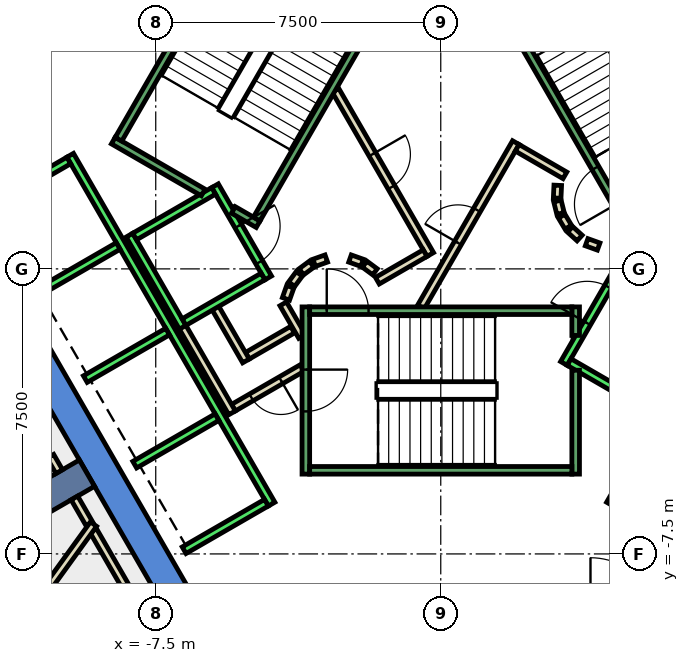
"""IFC4 building model, lengths in metres.
Left out: names, types, materials, properties, quantities, classifications, styles, units other than length and angle.
Written with IfcOpenShell. Run it as: python <this file> out.ifc"""

import sys

from ifc_helpers import new_model, si_unit, direction, frame, frame_2d, origin, place, context, subcontext, project, spatial, polyline, rectangle, outline, extrude, element, fill, save


model = new_model("IFC4")
c1 = context("Model", 3, precision=1e-05, world=origin(), true_north=direction((0.0, 1.0)))
c2 = subcontext(c1, "Body", "Model", "MODEL_VIEW")
j1 = project(units=[si_unit("LENGTHUNIT", "METRE"), si_unit("PLANEANGLEUNIT", "RADIAN")], contexts=[c1])
p1 = place(None, origin())
s1 = spatial("IfcSite", under=j1, at=p1, CompositionType="ELEMENT")
p2 = place(p1, origin())
s2 = spatial("IfcBuilding", under=s1, at=p2, CompositionType="ELEMENT")
p3 = place(p2, frame((0.0, 0.0, 171.8)))
s3 = spatial("IfcBuildingStorey", under=s2, at=p3, CompositionType="ELEMENT", Elevation=171.8)
p4 = place(p3, frame((0.0, 0.0, -0.4)))
e1 = element("IfcWall", 1, at=p4, inside=s3, PredefinedType="SHEAR", context=c2, shape_type="SweptSolid", body=[
    extrude(outline(polyline([(-12.267, 5.252), (-11.575, 4.852), (-6.466, 13.7), (-6.928, 14.5), (-12.267, 5.252)])), origin(), (0.0, 0.0, 1.0), 4.2),
])
p5 = place(p3, frame((0.0, 0.0, -0.4)))
e2 = element("IfcWall", 2, at=p5, inside=s3, PredefinedType="SHEAR", context=c2, shape_type="SweptSolid", body=[
    extrude(outline(polyline([(-13.856, 2.5), (-6.928, -9.5), (-6.466, -8.7), (-12.933, 2.5), (-13.856, 2.5)])), origin(), (0.0, 0.0, 1.0), 4.2),
])
p6 = place(p3, frame((-9.31, -5.375, -0.4), z_axis=(0.0, 0.0, 1.0), x_axis=(-0.866017533419, -0.500013631625, 0.0)))
e3 = element("IfcWall", 3, at=p6, inside=s3, PredefinedType="SHEAR", context=c2, shape_type="SweptSolid", body=[
    extrude(rectangle(XDim=9.0, YDim=0.8, at=frame_2d((4.5, 0.0))), origin(), (0.0, 0.0, 1.0), 4.2),
])
p7 = place(p3, frame((-3.9, -1.599, 0.0), z_axis=(0.0, 0.0, 1.0), x_axis=(-0.865969445389, -0.500096910261, 0.0)))
e4 = element("IfcWall", 4, at=p7, inside=s3, PredefinedType="PARTITIONING", context=c2, shape_type="SweptSolid", body=[
    extrude(rectangle(XDim=1.373, YDim=0.2, at=frame_2d((0.687, 0.0))), origin(), (0.0, 0.0, 1.0), 3.8),
])
p8 = place(p3, frame((-5.126, -2.422, 0.0), z_axis=(0.0, 0.0, 1.0), x_axis=(-0.500062241894, 0.865989465428, 0.0)))
e5 = element("IfcWall", 5, at=p8, inside=s3, PredefinedType="PARTITIONING", context=c2, shape_type="SweptSolid", body=[
    extrude(rectangle(XDim=1.7, YDim=0.2, at=frame_2d((0.85, 0.0))), origin(), (0.0, 0.0, 1.0), 3.8),
])
p9 = place(p3, frame((-3.65, -2.61, 0.0), z_axis=(0.0, 0.0, 1.0), x_axis=(-0.866072462134, -0.499918483688, 0.0)))
e6 = element("IfcWall", 6, at=p9, inside=s3, PredefinedType="PARTITIONING", context=c2, shape_type="SweptSolid", body=[
    extrude(rectangle(XDim=2.084, YDim=0.2, at=frame_2d((1.042, 0.0))), origin(), (0.0, 0.0, 1.0), 3.8),
])
p10 = place(p9, frame((0.642, 0.0, 0.0)))
e7 = element("IfcOpeningElement", 7, at=p10, cuts=e6, PredefinedType="OPENING", context=c2, shape_type="SweptSolid", body=[
    extrude(rectangle(XDim=0.9, YDim=2.1, at=frame_2d((0.45, 1.05))), frame((0.0, 0.11, 0.0), z_axis=(0.0, -1.0, 0.0), x_axis=(1.0, 0.0, 0.0)), (0.0, 0.0, 1.0), 0.22),
])
p11 = place(p3, frame((-5.492, -3.788, 0.0), z_axis=(0.0, 0.0, 1.0), x_axis=(-0.500008949224, 0.866020236886, 0.0)))
e8 = element("IfcWall", 8, at=p11, inside=s3, PredefinedType="PARTITIONING", context=c2, shape_type="SweptSolid", body=[
    extrude(rectangle(XDim=2.68, YDim=0.2, at=frame_2d((1.34, 0.0))), origin(), (0.0, 0.0, 1.0), 3.8),
])
p12 = place(p3, frame((-4.145, -0.92, 0.0), z_axis=(0.0, 0.0, 1.0), x_axis=(0.499743786207, -0.866173278362, 0.0)))
e9 = element("IfcWall", 9, at=p12, inside=s3, PredefinedType="PARTITIONING", context=c2, shape_type="SweptSolid", body=[
    extrude(rectangle(XDim=0.991, YDim=0.2, at=frame_2d((0.495, 0.0))), origin(), (0.0, 0.0, 1.0), 3.8),
])
p13 = place(p3, frame((-0.52, -1.0, 0.0), z_axis=(0.0, 0.0, 1.0), x_axis=(0.50011622646, 0.865958290007, 0.0)))
e10 = element("IfcWall", 10, at=p13, inside=s3, PredefinedType="PARTITIONING", context=c2, shape_type="SweptSolid", body=[
    extrude(rectangle(XDim=4.991, YDim=0.2, at=frame_2d((2.496, 0.0))), origin(), (0.0, 0.0, 1.0), 3.8),
])
p14 = place(p13, frame((1.945, 0.0, 0.0)))
e11 = element("IfcOpeningElement", 11, at=p14, cuts=e10, PredefinedType="OPENING", context=c2, shape_type="SweptSolid", body=[
    extrude(rectangle(XDim=1.0, YDim=2.1, at=frame_2d((0.5, 1.05))), frame((0.0, 0.11, 0.0), z_axis=(0.0, -1.0, 0.0), x_axis=(1.0, 0.0, 0.0)), (0.0, 0.0, 1.0), 0.22),
])
p15 = place(p3, frame((2.012, 3.186, 0.0), z_axis=(0.0, 0.0, 1.0), x_axis=(0.865891012941, -0.500232699559, 0.0)))
e12 = element("IfcWall", 12, at=p15, inside=s3, PredefinedType="PARTITIONING", context=c2, shape_type="SweptSolid", body=[
    extrude(rectangle(XDim=1.449, YDim=0.2, at=frame_2d((0.725, 0.0))), origin(), (0.0, 0.0, 1.0), 3.8),
])
p16 = place(p3, frame((3.079, 2.199, 0.0), z_axis=(0.0, 0.0, 1.0), x_axis=(-0.047771483479, -0.998858290933, 0.0)))
e13 = element("IfcWall", 13, at=p16, inside=s3, PredefinedType="PARTITIONING", context=c2, shape_type="SweptSolid", body=[
    extrude(rectangle(XDim=0.337, YDim=0.2, at=frame_2d((0.169, 0.0))), origin(), (0.0, 0.0, 1.0), 3.8),
])
p17 = place(p3, frame((3.07, 1.786, 0.0), z_axis=(0.0, 0.0, 1.0), x_axis=(0.242705583207, -0.970099994784, 0.0)))
e14 = element("IfcWall", 14, at=p17, inside=s3, PredefinedType="PARTITIONING", context=c2, shape_type="SweptSolid", body=[
    extrude(rectangle(XDim=0.338, YDim=0.2, at=frame_2d((0.169, 0.0))), origin(), (0.0, 0.0, 1.0), 3.8),
])
for number, where, z_axis, x_axis in (
    (15, (3.182, 1.388, 0.0), (0.0, 0.0, 1.0), (0.512, -0.859, 0.0)),
    (16, (3.404, 1.039, 0.0), (0.0, 0.0, 1.0), (0.74, -0.672, 0.0)),
):
    element("IfcWall", number, at=place(p3, frame(where, z_axis=z_axis, x_axis=x_axis)), inside=s3, PredefinedType="PARTITIONING", context=c2, shape_type="SweptSolid", body=[
        extrude(rectangle(XDim=0.338, YDim=0.2, at=frame_2d((0.169, 0.0))), origin(), (0.0, 0.0, 1.0), 3.8),
    ])
p18 = place(p3, frame((3.838, 0.702, 0.0), z_axis=(0.0, 0.0, 1.0), x_axis=(0.941035081519, -0.338308993895, 0.0)))
e17 = element("IfcWall", 17, at=p18, inside=s3, PredefinedType="PARTITIONING", context=c2, shape_type="SweptSolid", body=[
    extrude(rectangle(XDim=0.337, YDim=0.2, at=frame_2d((0.168, 0.0))), origin(), (0.0, 0.0, 1.0), 3.8),
])
p19 = place(p3, frame((-2.771, 4.7, 0.0), z_axis=(0.0, 0.0, 1.0), x_axis=(0.499969479948, -0.866043023828, 0.0)))
e18 = element("IfcWall", 18, at=p19, inside=s3, PredefinedType="PARTITIONING", context=c2, shape_type="SweptSolid", body=[
    extrude(rectangle(XDim=4.99, YDim=0.2, at=frame_2d((2.495, 0.0))), origin(), (0.0, 0.0, 1.0), 3.8),
])
p20 = place(p19, frame((1.945, 0.0, 0.0)))
e19 = element("IfcOpeningElement", 19, at=p20, cuts=e18, PredefinedType="OPENING", context=c2, shape_type="SweptSolid", body=[
    extrude(rectangle(XDim=1.0, YDim=2.1, at=frame_2d((0.5, 1.05))), frame((0.0, 0.11, 0.0), z_axis=(0.0, -1.0, 0.0), x_axis=(1.0, 0.0, 0.0)), (0.0, 0.0, 1.0), 0.22),
])
p21 = place(p3, frame((-0.412, 0.414, 0.0), z_axis=(0.0, 0.0, 1.0), x_axis=(-0.866017369001, -0.500013916395, 0.0)))
e20 = element("IfcWall", 20, at=p21, inside=s3, PredefinedType="PARTITIONING", context=c2, shape_type="SweptSolid", body=[
    extrude(rectangle(XDim=1.45, YDim=0.2, at=frame_2d((0.725, 0.0))), origin(), (0.0, 0.0, 1.0), 3.8),
])
p22 = place(p3, frame((-1.731, -0.077, 0.0), z_axis=(0.0, 0.0, 1.0), x_axis=(-0.804311165252, 0.594208338422, 0.0)))
e21 = element("IfcWall", 21, at=p22, inside=s3, PredefinedType="PARTITIONING", context=c2, shape_type="SweptSolid", body=[
    extrude(rectangle(XDim=0.338, YDim=0.2, at=frame_2d((0.169, 0.0))), origin(), (0.0, 0.0, 1.0), 3.8),
])
p23 = place(p3, frame((-2.07, 0.16, 0.0), z_axis=(0.0, 0.0, 1.0), x_axis=(-0.942199461132, 0.335052496547, 0.0)))
e22 = element("IfcWall", 22, at=p23, inside=s3, PredefinedType="PARTITIONING", context=c2, shape_type="SweptSolid", body=[
    extrude(rectangle(XDim=0.337, YDim=0.2, at=frame_2d((0.169, 0.0))), origin(), (0.0, 0.0, 1.0), 3.8),
])
p24 = place(p3, frame((-3.012, 0.273, 0.0), z_axis=(0.0, 0.0, 1.0), x_axis=(-0.942280615813, -0.334824194261, 0.0)))
e23 = element("IfcWall", 23, at=p24, inside=s3, PredefinedType="PARTITIONING", context=c2, shape_type="SweptSolid", body=[
    extrude(rectangle(XDim=0.338, YDim=0.2, at=frame_2d((0.169, 0.0))), origin(), (0.0, 0.0, 1.0), 3.8),
])
p25 = place(p3, frame((-3.397, 0.124, 0.0), z_axis=(0.0, 0.0, 1.0), x_axis=(-0.804311165252, -0.594208338422, 0.0)))
e24 = element("IfcWall", 24, at=p25, inside=s3, PredefinedType="PARTITIONING", context=c2, shape_type="SweptSolid", body=[
    extrude(rectangle(XDim=0.338, YDim=0.2, at=frame_2d((0.169, 0.0))), origin(), (0.0, 0.0, 1.0), 3.8),
])
p26 = place(p3, frame((-3.723, -0.131, 0.0), z_axis=(0.0, 0.0, 1.0), x_axis=(-0.594675113454, -0.803966112121, 0.0)))
e25 = element("IfcWall", 25, at=p26, inside=s3, PredefinedType="PARTITIONING", context=c2, shape_type="SweptSolid", body=[
    extrude(rectangle(XDim=0.338, YDim=0.2, at=frame_2d((0.169, 0.0))), origin(), (0.0, 0.0, 1.0), 3.8),
])
p27 = place(p3, frame((-3.96, -0.47, 0.0), z_axis=(0.0, 0.0, 1.0), x_axis=(-0.334824194261, -0.942280615813, 0.0)))
e26 = element("IfcWall", 26, at=p27, inside=s3, PredefinedType="PARTITIONING", context=c2, shape_type="SweptSolid", body=[
    extrude(rectangle(XDim=0.338, YDim=0.2, at=frame_2d((0.169, 0.0))), origin(), (0.0, 0.0, 1.0), 3.8),
])
p28 = place(p3, frame((-7.862, -9.107, 0.0), z_axis=(0.0, 0.0, 1.0), x_axis=(-0.499994038704, 0.866028845513, 0.0)))
e27 = element("IfcWall", 27, at=p28, inside=s3, PredefinedType="PARTITIONING", context=c2, shape_type="SweptSolid", body=[
    extrude(rectangle(XDim=2.568, YDim=0.2, at=frame_2d((1.284, 0.0))), origin(), (0.0, 0.0, 1.0), 3.8),
])
p29 = place(p3, frame((-9.246, -6.71, 0.0), z_axis=(0.0, 0.0, 1.0), x_axis=(-0.499570510076, 0.86627322795, 0.0)))
e28 = element("IfcWall", 28, at=p29, inside=s3, PredefinedType="PARTITIONING", context=c2, shape_type="SweptSolid", body=[
    extrude(rectangle(XDim=0.788, YDim=0.2, at=frame_2d((0.394, 0.0))), origin(), (0.0, 0.0, 1.0), 3.8),
])
p30 = place(p3, frame((-13.744, -13.076, 0.0), z_axis=(0.0, 0.0, 1.0), x_axis=(0.586577314901, 0.809893235953, 0.0)))
e29 = element("IfcWall", 29, at=p30, inside=s3, PredefinedType="PARTITIONING", context=c2, shape_type="SweptSolid", body=[
    extrude(rectangle(XDim=7.854, YDim=0.2, at=frame_2d((3.927, 0.0))), origin(), (0.0, 0.0, 1.0), 3.8),
])
p31 = place(p3, frame((-10.04, -5.334, 0.0), z_axis=(0.0, 0.0, 1.0), x_axis=(-0.499405191234, 0.86636854454, 0.0)))
e30 = element("IfcWall", 30, at=p31, inside=s3, PredefinedType="PARTITIONING", context=c2, shape_type="SweptSolid", body=[
    extrude(rectangle(XDim=0.466, YDim=0.2, at=frame_2d((0.233, 0.0))), origin(), (0.0, 0.0, 1.0), 3.8),
])
p32 = place(p3, frame((-5.94, 2.188, 0.0), z_axis=(0.0, 0.0, 1.0), x_axis=(0.49994636267, -0.866056369097, 0.0)))
e31 = element("IfcWall", 31, at=p32, inside=s3, PredefinedType="STANDARD", context=c2, shape_type="SweptSolid", body=[
    extrude(rectangle(XDim=2.8, YDim=0.2, at=frame_2d((1.4, 0.0))), origin(), (0.0, 0.0, 1.0), 3.8),
])
p33 = place(p32, frame((1.225, 0.0, 0.0)))
e32 = element("IfcOpeningElement", 32, at=p33, cuts=e31, PredefinedType="OPENING", context=c2, shape_type="SweptSolid", body=[
    extrude(rectangle(XDim=1.1, YDim=2.1, at=frame_2d((0.55, 1.05))), frame((0.0, 0.11, 0.0), z_axis=(0.0, -1.0, 0.0), x_axis=(1.0, 0.0, 0.0)), (0.0, 0.0, 1.0), 0.22),
])
p34 = place(p3, frame((-8.192, 0.888, 0.0), z_axis=(0.0, 0.0, 1.0), x_axis=(0.49994636267, -0.866056369097, 0.0)))
e33 = element("IfcWall", 33, at=p34, inside=s3, PredefinedType="STANDARD", context=c2, shape_type="SweptSolid", body=[
    extrude(rectangle(XDim=2.8, YDim=0.2, at=frame_2d((1.4, 0.0))), origin(), (0.0, 0.0, 1.0), 3.8),
])
for number, where, z_axis, x_axis in (
    (34, (-5.977, 2.052, 0.0), (0.0, 0.0, 1.0), (-0.866, -0.5, 0.0)),
    (35, (-4.677, -0.2, 0.0), (0.0, 0.0, 1.0), (-0.866, -0.5, 0.0)),
):
    element("IfcWall", number, at=place(p3, frame(where, z_axis=z_axis, x_axis=x_axis)), inside=s3, PredefinedType="STANDARD", context=c2, shape_type="SweptSolid", body=[
        extrude(rectangle(XDim=2.399, YDim=0.2, at=frame_2d((1.2, 0.0))), origin(), (0.0, 0.0, 1.0), 3.8),
    ])
p35 = place(p3, frame((-9.751, 2.99, 0.0), z_axis=(0.0, 0.0, 1.0), x_axis=(0.50000090737, -0.866024879913, 0.0)))
e36 = element("IfcWall", 36, at=p35, inside=s3, PredefinedType="STANDARD", context=c2, shape_type="SweptSolid", body=[
    extrude(rectangle(XDim=10.6, YDim=0.2, at=frame_2d((5.3, 0.0))), origin(), (0.0, 0.0, 1.0), 3.8),
])
p36 = place(p3, frame((-9.788, 2.853, 0.0), z_axis=(0.0, 0.0, 1.0), x_axis=(-0.865998541277, -0.500046524342, 0.0)))
e37 = element("IfcWall", 37, at=p36, inside=s3, PredefinedType="STANDARD", context=c2, shape_type="SweptSolid", body=[
    extrude(rectangle(XDim=2.5, YDim=0.2, at=frame_2d((1.25, 0.0))), origin(), (0.0, 0.0, 1.0), 3.8),
])
for number, where, z_axis, x_axis in (
    (38, (-8.488, 0.602, 0.0), (0.0, 0.0, 1.0), (-0.866, -0.5, 0.0)),
    (39, (-7.188, -1.65, 0.0), (0.0, 0.0, 1.0), (-0.866, -0.5, 0.0)),
    (40, (-5.888, -3.902, 0.0), (0.0, 0.0, 1.0), (-0.866, -0.5, 0.0)),
    (41, (-4.588, -6.153, 0.0), (0.0, 0.0, 1.0), (-0.866, -0.5, 0.0)),
):
    element("IfcWall", number, at=place(p3, frame(where, z_axis=z_axis, x_axis=x_axis)), inside=s3, PredefinedType="STANDARD", context=c2, shape_type="SweptSolid", body=[
        extrude(rectangle(XDim=2.5, YDim=0.2, at=frame_2d((1.25, 0.0))), origin(), (0.0, 0.0, 1.0), 3.8),
    ])
p37 = place(p3, frame((3.24, -2.488, 0.0), z_axis=(0.0, 0.0, 1.0), x_axis=(0.49994636267, 0.866056369097, 0.0)))
e42 = element("IfcWall", 42, at=p37, inside=s3, PredefinedType="STANDARD", context=c2, shape_type="SweptSolid", body=[
    extrude(rectangle(XDim=2.8, YDim=0.2, at=frame_2d((1.4, 0.0))), origin(), (0.0, 0.0, 1.0), 3.8),
])
p38 = place(p37, frame((1.225, 0.0, 0.0)))
e43 = element("IfcOpeningElement", 43, at=p38, cuts=e42, PredefinedType="OPENING", context=c2, shape_type="SweptSolid", body=[
    extrude(rectangle(XDim=1.1, YDim=2.1, at=frame_2d((0.55, 1.05))), frame((0.0, 0.11, 0.0), z_axis=(0.0, -1.0, 0.0), x_axis=(1.0, 0.0, 0.0)), (0.0, 0.0, 1.0), 0.22),
])
p39 = place(p3, frame((3.377, -2.452, 0.0), z_axis=(0.0, 0.0, 1.0), x_axis=(0.865955154139, -0.50012165622, 0.0)))
e44 = element("IfcWall", 44, at=p39, inside=s3, PredefinedType="STANDARD", context=c2, shape_type="SweptSolid", body=[
    extrude(rectangle(XDim=2.4, YDim=0.2, at=frame_2d((1.2, 0.0))), origin(), (0.0, 0.0, 1.0), 3.8),
])
p40 = place(p3, frame((4.451, -6.19, 0.0), z_axis=(0.0, 0.0, 1.0), x_axis=(0.50000090737, 0.866024879913, 0.0)))
e45 = element("IfcWall", 45, at=p40, inside=s3, PredefinedType="STANDARD", context=c2, shape_type="SweptSolid", body=[
    extrude(rectangle(XDim=10.6, YDim=0.2, at=frame_2d((5.3, 0.0))), origin(), (0.0, 0.0, 1.0), 3.8),
])
p41 = place(p3, frame((-3.55, -1.0, 0.0), z_axis=(0.0, 0.0, 1.0), x_axis=(0.0, -1.0, 0.0)))
e46 = element("IfcWall", 46, at=p41, inside=s3, PredefinedType="STANDARD", context=c2, shape_type="SweptSolid", body=[
    extrude(rectangle(XDim=4.4, YDim=0.2, at=frame_2d((2.2, 0.0))), origin(), (0.0, 0.0, 1.0), 3.8),
])
p42 = place(p41, frame((1.65, 0.0, 0.0)))
e47 = element("IfcOpeningElement", 47, at=p42, cuts=e46, PredefinedType="OPENING", context=c2, shape_type="SweptSolid", body=[
    extrude(rectangle(XDim=1.1, YDim=2.2, at=frame_2d((0.55, 1.1))), frame((0.0, 0.11, 0.0), z_axis=(0.0, -1.0, 0.0), x_axis=(1.0, 0.0, 0.0)), (0.0, 0.0, 1.0), 0.22),
])
p43 = place(p3, frame((3.55, -2.667, 0.0), z_axis=(0.0, 0.0, 1.0), x_axis=(0.0, -1.0, 0.0)))
e48 = element("IfcWall", 48, at=p43, inside=s3, PredefinedType="STANDARD", context=c2, shape_type="SweptSolid", body=[
    extrude(rectangle(XDim=2.733, YDim=0.2, at=frame_2d((1.366, 0.0))), origin(), (0.0, 0.0, 1.0), 3.8),
])
p44 = place(p3, frame((3.55, -1.0, 0.0), z_axis=(0.0, 0.0, 1.0), x_axis=(0.0, -1.0, 0.0)))
e49 = element("IfcWall", 49, at=p44, inside=s3, PredefinedType="STANDARD", context=c2, shape_type="SweptSolid", body=[
    extrude(rectangle(XDim=0.751, YDim=0.2, at=frame_2d((0.375, 0.0))), origin(), (0.0, 0.0, 1.0), 3.8),
])
p45 = place(p3, frame((-3.45, -1.1, 0.0), z_axis=(0.0, 0.0, 1.0), x_axis=(1.0, 0.0, 0.0)))
e50 = element("IfcWall", 50, at=p45, inside=s3, PredefinedType="STANDARD", context=c2, shape_type="SweptSolid", body=[
    extrude(rectangle(XDim=6.9, YDim=0.2, at=frame_2d((3.45, 0.0))), origin(), (0.0, 0.0, 1.0), 3.8),
])
p46 = place(p45, frame((0.45, 0.0, 0.0)))
e51 = element("IfcOpeningElement", 51, at=p46, cuts=e50, PredefinedType="OPENING", context=c2, shape_type="SweptSolid", body=[
    extrude(rectangle(XDim=1.1, YDim=2.2, at=frame_2d((0.55, 1.1))), frame((0.0, 0.11, 0.0), z_axis=(0.0, -1.0, 0.0), x_axis=(1.0, 0.0, 0.0)), (0.0, 0.0, 1.0), 0.22),
])
p47 = place(p3, frame((-3.45, -5.3, 0.0), z_axis=(0.0, 0.0, 1.0), x_axis=(1.0, 0.0, 0.0)))
e52 = element("IfcWall", 52, at=p47, inside=s3, PredefinedType="STANDARD", context=c2, shape_type="SweptSolid", body=[
    extrude(rectangle(XDim=6.9, YDim=0.2, at=frame_2d((3.45, 0.0))), origin(), (0.0, 0.0, 1.0), 3.8),
])
p48 = place(p3, frame((4.843, 1.312, 0.0), z_axis=(0.0, 0.0, 1.0), x_axis=(-0.499963383562, 0.866046543262, 0.0)))
e53 = element("IfcWall", 53, at=p48, inside=s3, PredefinedType="STANDARD", context=c2, shape_type="SweptSolid", body=[
    extrude(rectangle(XDim=6.9, YDim=0.2, at=frame_2d((3.45, 0.0))), origin(), (0.0, 0.0, 1.0), 3.8),
])
p49 = place(p48, frame((0.45, 0.0, 0.0)))
e54 = element("IfcOpeningElement", 54, at=p49, cuts=e53, PredefinedType="OPENING", context=c2, shape_type="SweptSolid", body=[
    extrude(rectangle(XDim=1.1, YDim=2.2, at=frame_2d((0.55, 1.1))), frame((0.0, 0.11, 0.0), z_axis=(0.0, -1.0, 0.0), x_axis=(1.0, 0.0, 0.0)), (0.0, 0.0, 1.0), 0.22),
])
p50 = place(p3, frame((-6.25, 2.01, 0.0), z_axis=(0.0, 0.0, 1.0), x_axis=(-0.86611865017, 0.499838457731, 0.0)))
e55 = element("IfcWall", 55, at=p50, inside=s3, PredefinedType="STANDARD", context=c2, shape_type="SweptSolid", body=[
    extrude(rectangle(XDim=2.733, YDim=0.2, at=frame_2d((1.366, 0.0))), origin(), (0.0, 0.0, 1.0), 3.8),
])
p51 = place(p3, frame((-4.806, 1.176, 0.0), z_axis=(0.0, 0.0, 1.0), x_axis=(-0.866558586415, 0.499075361355, 0.0)))
e56 = element("IfcWall", 56, at=p51, inside=s3, PredefinedType="STANDARD", context=c2, shape_type="SweptSolid", body=[
    extrude(rectangle(XDim=0.751, YDim=0.2, at=frame_2d((0.376, 0.0))), origin(), (0.0, 0.0, 1.0), 3.8),
])
p52 = place(p3, frame((-1.393, 7.288, 0.0), z_axis=(0.0, 0.0, 1.0), x_axis=(-0.499963383562, -0.866046543262, 0.0)))
e57 = element("IfcWall", 57, at=p52, inside=s3, PredefinedType="STANDARD", context=c2, shape_type="SweptSolid", body=[
    extrude(rectangle(XDim=6.9, YDim=0.2, at=frame_2d((3.45, 0.0))), origin(), (0.0, 0.0, 1.0), 3.8),
])
p53 = place(p52, frame((0.45, 0.0, 0.0)))
e58 = element("IfcOpeningElement", 58, at=p53, cuts=e57, PredefinedType="OPENING", context=c2, shape_type="SweptSolid", body=[
    extrude(rectangle(XDim=1.1, YDim=2.2, at=frame_2d((0.55, 1.1))), frame((0.0, 0.11, 0.0), z_axis=(0.0, -1.0, 0.0), x_axis=(1.0, 0.0, 0.0)), (0.0, 0.0, 1.0), 0.22),
])
p54 = place(p3, frame((-5.03, 9.388, 0.0), z_axis=(0.0, 0.0, 1.0), x_axis=(-0.499978703459, -0.866037698999, 0.0)))
e59 = element("IfcWall", 59, at=p54, inside=s3, PredefinedType="STANDARD", context=c2, shape_type="SweptSolid", body=[
    extrude(rectangle(XDim=6.9, YDim=0.2, at=frame_2d((3.45, 0.0))), origin(), (0.0, 0.0, 1.0), 3.8),
])
p55 = place(p14, origin())
e60 = element("IfcDoor", 60, at=p55, inside=s3, OperationType="SINGLE_SWING_LEFT", PredefinedType="DOOR", context=c2, shape_type="SweptSolid", body=[
    extrude(rectangle(XDim=1.0, YDim=2.1, at=frame_2d((0.5, 1.05))), frame((0.0, 0.025, 0.0), z_axis=(0.0, -1.0, 0.0), x_axis=(1.0, 0.0, 0.0)), (0.0, 0.0, 1.0), 0.05),
])
fill(e11, e60)
p56 = place(p20, origin())
e61 = element("IfcDoor", 61, at=p56, inside=s3, OperationType="SINGLE_SWING_RIGHT", PredefinedType="DOOR", context=c2, shape_type="SweptSolid", body=[
    extrude(rectangle(XDim=1.0, YDim=2.1, at=frame_2d((0.5, 1.05))), frame((0.0, 0.025, 0.0), z_axis=(0.0, -1.0, 0.0), x_axis=(1.0, 0.0, 0.0)), (0.0, 0.0, 1.0), 0.05),
])
fill(e19, e61)
p57 = place(p10, origin())
e62 = element("IfcDoor", 62, at=p57, inside=s3, OperationType="SINGLE_SWING_LEFT", PredefinedType="DOOR", context=c2, shape_type="SweptSolid", body=[
    extrude(rectangle(XDim=0.9, YDim=2.1, at=frame_2d((0.45, 1.05))), frame((0.0, 0.025, 0.0), z_axis=(0.0, -1.0, 0.0), x_axis=(1.0, 0.0, 0.0)), (0.0, 0.0, 1.0), 0.05),
])
fill(e7, e62)
p58 = place(p38, origin())
e63 = element("IfcDoor", 63, at=p58, inside=s3, OperationType="SLIDING_TO_LEFT", PredefinedType="DOOR", context=c2, shape_type="SweptSolid", body=[
    extrude(rectangle(XDim=1.1, YDim=2.1, at=frame_2d((0.55, 1.05))), frame((0.0, 0.025, 0.0), z_axis=(0.0, -1.0, 0.0), x_axis=(1.0, 0.0, 0.0)), (0.0, 0.0, 1.0), 0.05),
])
fill(e43, e63)
p59 = place(p33, origin())
e64 = element("IfcDoor", 64, at=p59, inside=s3, OperationType="SLIDING_TO_LEFT", PredefinedType="DOOR", context=c2, shape_type="SweptSolid", body=[
    extrude(rectangle(XDim=1.1, YDim=2.1, at=frame_2d((0.55, 1.05))), frame((0.0, 0.025, 0.0), z_axis=(0.0, -1.0, 0.0), x_axis=(1.0, 0.0, 0.0)), (0.0, 0.0, 1.0), 0.05),
])
fill(e32, e64)
p60 = place(p46, origin())
e65 = element("IfcDoor", 65, at=p60, inside=s3, OperationType="SINGLE_SWING_LEFT", PredefinedType="DOOR", context=c2, shape_type="SweptSolid", body=[
    extrude(rectangle(XDim=1.1, YDim=2.2, at=frame_2d((0.55, 1.1))), frame((0.0, 0.025, 0.0), z_axis=(0.0, -1.0, 0.0), x_axis=(1.0, 0.0, 0.0)), (0.0, 0.0, 1.0), 0.05),
])
fill(e51, e65)
p61 = place(p42, origin())
e66 = element("IfcDoor", 66, at=p61, inside=s3, OperationType="SINGLE_SWING_LEFT", PredefinedType="DOOR", context=c2, shape_type="SweptSolid", body=[
    extrude(rectangle(XDim=1.1, YDim=2.2, at=frame_2d((0.55, 1.1))), frame((0.0, 0.025, 0.0), z_axis=(0.0, -1.0, 0.0), x_axis=(1.0, 0.0, 0.0)), (0.0, 0.0, 1.0), 0.05),
])
fill(e47, e66)
p62 = place(p49, origin())
e67 = element("IfcDoor", 67, at=p62, inside=s3, OperationType="SINGLE_SWING_LEFT", PredefinedType="DOOR", context=c2, shape_type="SweptSolid", body=[
    extrude(rectangle(XDim=1.1, YDim=2.2, at=frame_2d((0.55, 1.1))), frame((0.0, 0.025, 0.0), z_axis=(0.0, -1.0, 0.0), x_axis=(1.0, 0.0, 0.0)), (0.0, 0.0, 1.0), 0.05),
])
fill(e54, e67)
save(model, sys.argv[1])
